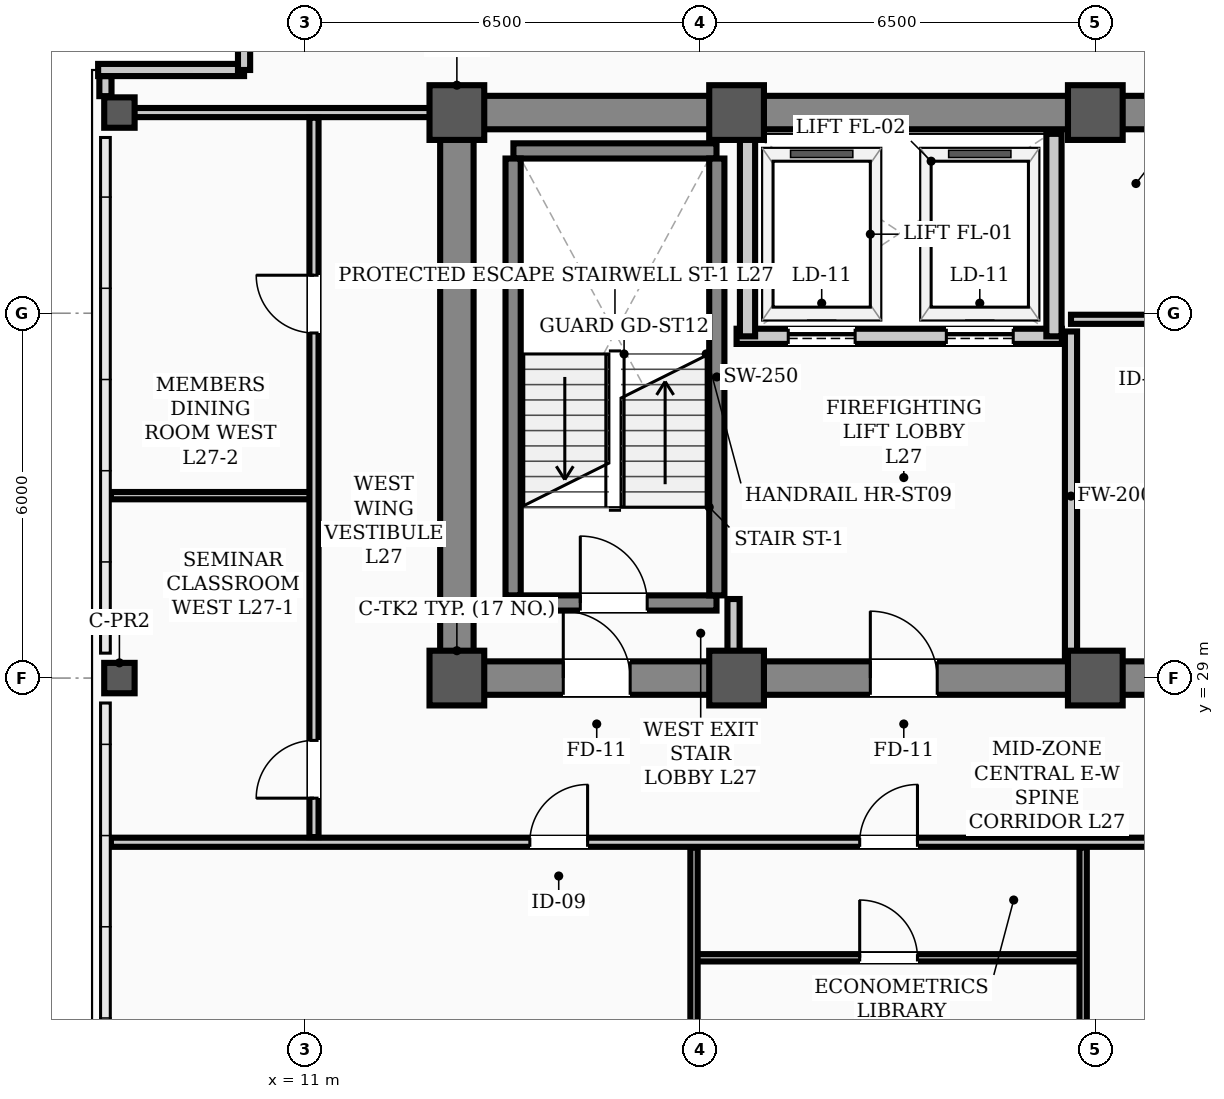
"""IFC4 building model, lengths in metres.
Left out: names, types, materials, properties, quantities, classifications, styles, units other than length and angle.
Written with IfcOpenShell. Run it as: python <this file> out.ifc"""

import sys

from ifc_helpers import new_model, si_unit, direction, frame, frame_2d, origin, origin_2d, place, context, subcontext, project, spatial, rectangle, hollow_rectangle, extrude, element, fill, save


model = new_model("IFC4")
c1 = context("Model", 3, precision=1e-05, world=origin(), true_north=direction((0.0, 1.0)))
c2 = subcontext(c1, "Body", "Model", "MODEL_VIEW")
j1 = project(units=[si_unit("LENGTHUNIT", "METRE"), si_unit("PLANEANGLEUNIT", "RADIAN")], contexts=[c1])
p1 = place(None, origin())
s1 = spatial("IfcSite", under=j1, at=p1, CompositionType="ELEMENT")
p2 = place(p1, origin())
s2 = spatial("IfcBuilding", under=s1, at=p2, CompositionType="ELEMENT")
p3 = place(p2, frame((0.0, 0.0, 111.0)))
s3 = spatial("IfcBuildingStorey", under=s2, at=p3, CompositionType="ELEMENT", Elevation=111.0)
for number, where, z_axis, x_axis in (
    (1, (13.5, 29.0, 0.0), (0.0, 0.0, 1.0), (1.0, 0.0, 0.0)),
    (2, (13.5, 38.3, 0.0), (0.0, 0.0, 1.0), (1.0, 0.0, 0.0)),
    (3, (18.1, 29.0, 0.0), (0.0, 0.0, 1.0), (1.0, 0.0, 0.0)),
    (4, (18.1, 38.3, 0.0), (0.0, 0.0, 1.0), (1.0, 0.0, 0.0)),
    (5, (24.0, 29.0, 0.0), (0.0, 0.0, 1.0), (1.0, 0.0, 0.0)),
    (6, (24.0, 38.3, 0.0), (0.0, 0.0, 1.0), (1.0, 0.0, 0.0)),
):
    element("IfcColumn", number, at=place(p3, frame(where, z_axis=z_axis, x_axis=x_axis)), inside=s3, PredefinedType="COLUMN", context=c2, shape_type="SweptSolid", body=[
        extrude(hollow_rectangle(XDim=0.9, YDim=0.9, WallThickness=0.035, InnerFilletRadius=0.017, OuterFilletRadius=0.052, at=origin_2d()), origin(), (0.0, 0.0, 1.0), 3.9),
    ])
for number, where, z_axis, x_axis in (
    (7, (7.95, 29.0, 0.0), (0.0, 0.0, 1.0), (1.0, 0.0, 0.0)),
    (8, (7.95, 38.3, 0.0), (0.0, 0.0, 1.0), (1.0, 0.0, 0.0)),
):
    element("IfcColumn", number, at=place(p3, frame(where, z_axis=z_axis, x_axis=x_axis)), inside=s3, PredefinedType="COLUMN", context=c2, shape_type="SweptSolid", body=[
        extrude(hollow_rectangle(XDim=0.5, YDim=0.5, WallThickness=0.024, InnerFilletRadius=0.012, OuterFilletRadius=0.036, at=origin_2d()), origin(), (0.0, 0.0, 1.0), 3.9),
    ])
p4 = place(p3, frame((7.72, 38.57, 0.0), z_axis=(0.0, 0.0, 1.0), x_axis=(0.0, 1.0, 0.0)))
e9 = element("IfcWall", 9, at=p4, inside=s3, PredefinedType="PARAPET", context=c2, shape_type="SweptSolid", body=[
    extrude(rectangle(XDim=0.33, YDim=0.2, at=frame_2d((0.165, 0.0))), origin(), (0.0, 0.0, 1.0), 1.2),
])
for number, where, z_axis, x_axis in (
    (10, (7.6, 39.0, 0.0), (0.0, 0.0, 1.0), (1.0, 0.0, 0.0)),
    (11, (10.0, 39.0, 0.0), (0.0, 0.0, 1.0), (0.0, 1.0, 0.0)),
):
    element("IfcWall", number, at=place(p3, frame(where, z_axis=z_axis, x_axis=x_axis)), inside=s3, PredefinedType="PARAPET", context=c2, shape_type="SweptSolid", body=[
        extrude(rectangle(XDim=2.4, YDim=0.2, at=frame_2d((1.2, 0.0))), origin(), (0.0, 0.0, 1.0), 1.2),
    ])
p5 = place(p3, frame((13.5, 29.0, 0.0), z_axis=(0.0, 0.0, 1.0), x_axis=(1.0, 0.0, 0.0)))
e12 = element("IfcWall", 12, at=p5, inside=s3, PredefinedType="SHEAR", context=c2, shape_type="SweptSolid", body=[
    extrude(rectangle(XDim=30.5, YDim=0.55, at=frame_2d((15.25, 0.0))), origin(), (0.0, 0.0, 1.0), 3.66),
])
p6 = place(p5, frame((1.75, 0.0, 0.0)))
e13 = element("IfcOpeningElement", 13, at=p6, cuts=e12, PredefinedType="OPENING", context=c2, shape_type="SweptSolid", body=[
    extrude(rectangle(XDim=1.1, YDim=2.08, at=frame_2d((0.55, 1.04))), frame((0.0, 0.285, 0.0), z_axis=(0.0, -1.0, 0.0), x_axis=(1.0, 0.0, 0.0)), (0.0, 0.0, 1.0), 0.57),
])
p7 = place(p5, frame((26.7, 0.0, 0.0)))
e14 = element("IfcOpeningElement", 14, at=p7, cuts=e12, PredefinedType="OPENING", context=c2, shape_type="SweptSolid", body=[
    extrude(rectangle(XDim=1.1, YDim=2.08, at=frame_2d((0.55, 1.04))), frame((0.0, 0.285, 0.0), z_axis=(0.0, -1.0, 0.0), x_axis=(1.0, 0.0, 0.0)), (0.0, 0.0, 1.0), 0.57),
])
p8 = place(p5, frame((6.8, 0.0, 0.0)))
e15 = element("IfcOpeningElement", 15, at=p8, cuts=e12, PredefinedType="OPENING", context=c2, shape_type="SweptSolid", body=[
    extrude(rectangle(XDim=1.1, YDim=2.08, at=frame_2d((0.55, 1.04))), frame((0.0, 0.285, 0.0), z_axis=(0.0, -1.0, 0.0), x_axis=(1.0, 0.0, 0.0)), (0.0, 0.0, 1.0), 0.57),
])
p9 = place(p5, frame((13.2, 0.0, 0.0)))
e16 = element("IfcOpeningElement", 16, at=p9, cuts=e12, PredefinedType="OPENING", context=c2, shape_type="SweptSolid", body=[
    extrude(rectangle(XDim=1.6, YDim=2.08, at=frame_2d((0.8, 1.04))), frame((0.0, 0.285, 0.0), z_axis=(0.0, -1.0, 0.0), x_axis=(1.0, 0.0, 0.0)), (0.0, 0.0, 1.0), 0.57),
])
p10 = place(p5, frame((19.6, 0.0, 0.0)))
e17 = element("IfcOpeningElement", 17, at=p10, cuts=e12, PredefinedType="OPENING", context=c2, shape_type="SweptSolid", body=[
    extrude(rectangle(XDim=0.9, YDim=2.08, at=frame_2d((0.45, 1.04))), frame((0.0, 0.285, 0.0), z_axis=(0.0, -1.0, 0.0), x_axis=(1.0, 0.0, 0.0)), (0.0, 0.0, 1.0), 0.57),
])
p11 = place(p5, frame((21.6, 0.0, 0.0)))
e18 = element("IfcOpeningElement", 18, at=p11, cuts=e12, PredefinedType="OPENING", context=c2, shape_type="SweptSolid", body=[
    extrude(rectangle(XDim=0.9, YDim=2.08, at=frame_2d((0.45, 1.04))), frame((0.0, 0.285, 0.0), z_axis=(0.0, -1.0, 0.0), x_axis=(1.0, 0.0, 0.0)), (0.0, 0.0, 1.0), 0.57),
])
p12 = place(p3, frame((13.5, 38.3, 0.0), z_axis=(0.0, 0.0, 1.0), x_axis=(1.0, 0.0, 0.0)))
e19 = element("IfcWall", 19, at=p12, inside=s3, PredefinedType="SHEAR", context=c2, shape_type="SweptSolid", body=[
    extrude(rectangle(XDim=30.5, YDim=0.55, at=frame_2d((15.25, 0.0))), origin(), (0.0, 0.0, 1.0), 3.66),
])
p13 = place(p3, frame((13.5, 29.35, 0.0), z_axis=(0.0, 0.0, 1.0), x_axis=(0.0, 1.0, 0.0)))
e20 = element("IfcWall", 20, at=p13, inside=s3, PredefinedType="SHEAR", context=c2, shape_type="SweptSolid", body=[
    extrude(rectangle(XDim=8.6, YDim=0.55, at=frame_2d((4.3, 0.0))), origin(), (0.0, 0.0, 1.0), 3.66),
])
p14 = place(p3, frame((14.43, 30.235, 0.0), z_axis=(0.0, 0.0, 1.0), x_axis=(1.0, 0.0, 0.0)))
e21 = element("IfcWall", 21, at=p14, inside=s3, PredefinedType="STANDARD", context=c2, shape_type="SweptSolid", body=[
    extrude(rectangle(XDim=3.34, YDim=0.25, at=frame_2d((1.67, 0.0))), origin(), (0.0, 0.0, 1.0), 3.66),
])
p15 = place(p14, frame((1.1, 0.0, 0.0)))
e22 = element("IfcOpeningElement", 22, at=p15, cuts=e21, PredefinedType="OPENING", context=c2, shape_type="SweptSolid", body=[
    extrude(rectangle(XDim=1.1, YDim=2.08, at=frame_2d((0.55, 1.04))), frame((0.0, 0.135, 0.0), z_axis=(0.0, -1.0, 0.0), x_axis=(1.0, 0.0, 0.0)), (0.0, 0.0, 1.0), 0.27),
])
p16 = place(p3, frame((14.43, 37.669, 0.0), z_axis=(0.0, 0.0, 1.0), x_axis=(1.0, 0.0, 0.0)))
e23 = element("IfcWall", 23, at=p16, inside=s3, PredefinedType="STANDARD", context=c2, shape_type="SweptSolid", body=[
    extrude(rectangle(XDim=3.34, YDim=0.25, at=frame_2d((1.67, 0.0))), origin(), (0.0, 0.0, 1.0), 3.66),
])
for number, where, z_axis, x_axis in (
    (24, (14.425, 30.36, 0.0), (0.0, 0.0, 1.0), (0.0, 1.0, 0.0)),
    (25, (17.775, 30.36, 0.0), (0.0, 0.0, 1.0), (0.0, 1.0, 0.0)),
):
    element("IfcWall", number, at=place(p3, frame(where, z_axis=z_axis, x_axis=x_axis)), inside=s3, PredefinedType="STANDARD", context=c2, shape_type="SweptSolid", body=[
        extrude(rectangle(XDim=7.184, YDim=0.25, at=frame_2d((3.592, 0.0))), origin(), (0.0, 0.0, 1.0), 3.66),
    ])
p17 = place(p3, frame((18.1, 34.62, 0.0), z_axis=(0.0, 0.0, 1.0), x_axis=(1.0, 0.0, 0.0)))
e26 = element("IfcWall", 26, at=p17, inside=s3, PredefinedType="STANDARD", context=c2, shape_type="SweptSolid", body=[
    extrude(rectangle(XDim=5.35, YDim=0.25, at=frame_2d((2.675, 0.0))), origin(), (0.0, 0.0, 1.0), 3.66),
])
p18 = place(p17, frame((0.85, 0.0, 0.0)))
e27 = element("IfcOpeningElement", 27, at=p18, cuts=e26, PredefinedType="OPENING", context=c2, shape_type="SweptSolid", body=[
    extrude(rectangle(XDim=1.1, YDim=2.08, at=frame_2d((0.55, 1.04))), frame((0.0, 0.135, 0.0), z_axis=(0.0, -1.0, 0.0), x_axis=(1.0, 0.0, 0.0)), (0.0, 0.0, 1.0), 0.27),
])
p19 = place(p17, frame((3.45, 0.0, 0.0)))
e28 = element("IfcOpeningElement", 28, at=p19, cuts=e26, PredefinedType="OPENING", context=c2, shape_type="SweptSolid", body=[
    extrude(rectangle(XDim=1.1, YDim=2.08, at=frame_2d((0.55, 1.04))), frame((0.0, 0.135, 0.0), z_axis=(0.0, -1.0, 0.0), x_axis=(1.0, 0.0, 0.0)), (0.0, 0.0, 1.0), 0.27),
])
for number, where, z_axis, x_axis in (
    (29, (18.28, 34.62, 0.0), (0.0, 0.0, 1.0), (0.0, 1.0, 0.0)),
    (30, (23.32, 34.62, 0.0), (0.0, 0.0, 1.0), (0.0, 1.0, 0.0)),
):
    element("IfcWall", number, at=place(p3, frame(where, z_axis=z_axis, x_axis=x_axis)), inside=s3, PredefinedType="STANDARD", context=c2, shape_type="SweptSolid", body=[
        extrude(rectangle(XDim=3.33, YDim=0.25, at=frame_2d((1.665, 0.0))), origin(), (0.0, 0.0, 1.0), 2.24),
    ])
p20 = place(p3, frame((23.6, 34.9, 0.0), z_axis=(0.0, 0.0, 1.0), x_axis=(1.0, 0.0, 0.0)))
e31 = element("IfcWall", 31, at=p20, inside=s3, PredefinedType="PARTITIONING", context=c2, shape_type="SweptSolid", body=[
    extrude(rectangle(XDim=4.58, YDim=0.15, at=frame_2d((2.29, 0.0))), origin(), (0.0, 0.0, 1.0), 3.66),
])
p21 = place(p20, frame((1.875, 0.0, 0.0)))
e32 = element("IfcOpeningElement", 32, at=p21, cuts=e31, PredefinedType="OPENING", context=c2, shape_type="SweptSolid", body=[
    extrude(rectangle(XDim=0.95, YDim=2.08, at=frame_2d((0.475, 1.04))), frame((0.0, 0.085, 0.0), z_axis=(0.0, -1.0, 0.0), x_axis=(1.0, 0.0, 0.0)), (0.0, 0.0, 1.0), 0.17),
])
p22 = place(p3, frame((7.81, 26.3, 0.0), z_axis=(0.0, 0.0, 1.0), x_axis=(1.0, 0.0, 0.0)))
e33 = element("IfcWall", 33, at=p22, inside=s3, PredefinedType="PARTITIONING", context=c2, shape_type="SweptSolid", body=[
    extrude(rectangle(XDim=49.38, YDim=0.15, at=frame_2d((24.69, 0.0))), origin(), (0.0, 0.0, 1.0), 2.24),
])
p23 = place(p22, frame((6.89, 0.0, 0.0)))
e34 = element("IfcOpeningElement", 34, at=p23, cuts=e33, PredefinedType="OPENING", context=c2, shape_type="SweptSolid", body=[
    extrude(rectangle(XDim=0.95, YDim=2.08, at=frame_2d((0.475, 1.04))), frame((0.0, 0.085, 0.0), z_axis=(0.0, -1.0, 0.0), x_axis=(1.0, 0.0, 0.0)), (0.0, 0.0, 1.0), 0.17),
])
p24 = place(p22, frame((12.315, 0.0, 0.0)))
e35 = element("IfcOpeningElement", 35, at=p24, cuts=e33, PredefinedType="OPENING", context=c2, shape_type="SweptSolid", body=[
    extrude(rectangle(XDim=0.95, YDim=2.08, at=frame_2d((0.475, 1.04))), frame((0.0, 0.085, 0.0), z_axis=(0.0, -1.0, 0.0), x_axis=(1.0, 0.0, 0.0)), (0.0, 0.0, 1.0), 0.17),
])
p25 = place(p22, frame((18.815, 0.0, 0.0)))
e36 = element("IfcOpeningElement", 36, at=p25, cuts=e33, PredefinedType="OPENING", context=c2, shape_type="SweptSolid", body=[
    extrude(rectangle(XDim=0.95, YDim=2.08, at=frame_2d((0.475, 1.04))), frame((0.0, 0.085, 0.0), z_axis=(0.0, -1.0, 0.0), x_axis=(1.0, 0.0, 0.0)), (0.0, 0.0, 1.0), 0.17),
])
p26 = place(p22, frame((25.415, 0.0, 0.0)))
e37 = element("IfcOpeningElement", 37, at=p26, cuts=e33, PredefinedType="OPENING", context=c2, shape_type="SweptSolid", body=[
    extrude(rectangle(XDim=0.95, YDim=2.08, at=frame_2d((0.475, 1.04))), frame((0.0, 0.085, 0.0), z_axis=(0.0, -1.0, 0.0), x_axis=(1.0, 0.0, 0.0)), (0.0, 0.0, 1.0), 0.17),
])
p27 = place(p22, frame((31.915, 0.0, 0.0)))
e38 = element("IfcOpeningElement", 38, at=p27, cuts=e33, PredefinedType="OPENING", context=c2, shape_type="SweptSolid", body=[
    extrude(rectangle(XDim=0.95, YDim=2.08, at=frame_2d((0.475, 1.04))), frame((0.0, 0.085, 0.0), z_axis=(0.0, -1.0, 0.0), x_axis=(1.0, 0.0, 0.0)), (0.0, 0.0, 1.0), 0.17),
])
p28 = place(p22, frame((36.59, 0.0, 0.0)))
e39 = element("IfcOpeningElement", 39, at=p28, cuts=e33, PredefinedType="OPENING", context=c2, shape_type="SweptSolid", body=[
    extrude(rectangle(XDim=0.95, YDim=2.08, at=frame_2d((0.475, 1.04))), frame((0.0, 0.085, 0.0), z_axis=(0.0, -1.0, 0.0), x_axis=(1.0, 0.0, 0.0)), (0.0, 0.0, 1.0), 0.17),
])
p29 = place(p3, frame((7.81, 38.3, 0.0), z_axis=(0.0, 0.0, 1.0), x_axis=(1.0, 0.0, 0.0)))
e40 = element("IfcWall", 40, at=p29, inside=s3, PredefinedType="PARTITIONING", context=c2, shape_type="SweptSolid", body=[
    extrude(rectangle(XDim=5.69, YDim=0.15, at=frame_2d((2.845, 0.0))), origin(), (0.0, 0.0, 1.0), 2.24),
])
p30 = place(p3, frame((17.4, 24.4, 0.0), z_axis=(0.0, 0.0, 1.0), x_axis=(1.0, 0.0, 0.0)))
e41 = element("IfcWall", 41, at=p30, inside=s3, PredefinedType="PARTITIONING", context=c2, shape_type="SweptSolid", body=[
    extrude(rectangle(XDim=6.4, YDim=0.12, at=frame_2d((3.2, 0.0))), origin(), (0.0, 0.0, 1.0), 2.24),
])
p31 = place(p30, frame((2.725, 0.0, 0.0)))
e42 = element("IfcOpeningElement", 42, at=p31, cuts=e41, PredefinedType="OPENING", context=c2, shape_type="SweptSolid", body=[
    extrude(rectangle(XDim=0.95, YDim=2.08, at=frame_2d((0.475, 1.04))), frame((0.0, 0.07, 0.0), z_axis=(0.0, -1.0, 0.0), x_axis=(1.0, 0.0, 0.0)), (0.0, 0.0, 1.0), 0.14),
])
p32 = place(p3, frame((7.81, 32.0, 0.0), z_axis=(0.0, 0.0, 1.0), x_axis=(1.0, 0.0, 0.0)))
e43 = element("IfcWall", 43, at=p32, inside=s3, PredefinedType="PARTITIONING", context=c2, shape_type="SweptSolid", body=[
    extrude(rectangle(XDim=3.34, YDim=0.12, at=frame_2d((1.67, 0.0))), origin(), (0.0, 0.0, 1.0), 3.66),
])
p33 = place(p3, frame((18.05, 29.285, 0.0), z_axis=(0.0, 0.0, 1.0), x_axis=(0.0, 1.0, 0.0)))
e44 = element("IfcWall", 44, at=p33, inside=s3, PredefinedType="STANDARD", context=c2, shape_type="SweptSolid", body=[
    extrude(rectangle(XDim=1.015, YDim=0.2, at=frame_2d((0.508, 0.0))), origin(), (0.0, 0.0, 1.0), 2.24),
])
p34 = place(p3, frame((23.6, 29.285, 0.0), z_axis=(0.0, 0.0, 1.0), x_axis=(0.0, 1.0, 0.0)))
e45 = element("IfcWall", 45, at=p34, inside=s3, PredefinedType="STANDARD", context=c2, shape_type="SweptSolid", body=[
    extrude(rectangle(XDim=5.415, YDim=0.2, at=frame_2d((2.708, 0.0))), origin(), (0.0, 0.0, 1.0), 2.24),
])
p35 = place(p3, frame((11.15, 26.385, 0.0), z_axis=(0.0, 0.0, 1.0), x_axis=(0.0, 1.0, 0.0)))
e46 = element("IfcWall", 46, at=p35, inside=s3, PredefinedType="PARTITIONING", context=c2, shape_type="SweptSolid", body=[
    extrude(rectangle(XDim=11.83, YDim=0.15, at=frame_2d((5.915, 0.0))), origin(), (0.0, 0.0, 1.0), 2.24),
])
p36 = place(p35, frame((0.64, 0.0, 0.0)))
e47 = element("IfcOpeningElement", 47, at=p36, cuts=e46, PredefinedType="OPENING", context=c2, shape_type="SweptSolid", body=[
    extrude(rectangle(XDim=0.95, YDim=2.08, at=frame_2d((0.475, 1.04))), frame((0.0, 0.085, 0.0), z_axis=(0.0, -1.0, 0.0), x_axis=(1.0, 0.0, 0.0)), (0.0, 0.0, 1.0), 0.17),
])
p37 = place(p35, frame((8.29, 0.0, 0.0)))
e48 = element("IfcOpeningElement", 48, at=p37, cuts=e46, PredefinedType="OPENING", context=c2, shape_type="SweptSolid", body=[
    extrude(rectangle(XDim=0.95, YDim=2.08, at=frame_2d((0.475, 1.04))), frame((0.0, 0.085, 0.0), z_axis=(0.0, -1.0, 0.0), x_axis=(1.0, 0.0, 0.0)), (0.0, 0.0, 1.0), 0.17),
])
p38 = place(p3, frame((17.4, 9.81, 0.0), z_axis=(0.0, 0.0, 1.0), x_axis=(0.0, 1.0, 0.0)))
e49 = element("IfcWall", 49, at=p38, inside=s3, PredefinedType="PARTITIONING", context=c2, shape_type="SweptSolid", body=[
    extrude(rectangle(XDim=16.405, YDim=0.12, at=frame_2d((8.203, 0.0))), origin(), (0.0, 0.0, 1.0), 2.24),
])
p39 = place(p3, frame((23.8, 11.57, 0.0), z_axis=(0.0, 0.0, 1.0), x_axis=(0.0, 1.0, 0.0)))
e50 = element("IfcWall", 50, at=p39, inside=s3, PredefinedType="PARTITIONING", context=c2, shape_type="SweptSolid", body=[
    extrude(rectangle(XDim=14.645, YDim=0.12, at=frame_2d((7.323, 0.0))), origin(), (0.0, 0.0, 1.0), 2.24),
])
p40 = place(p15, origin())
e51 = element("IfcDoor", 51, at=p40, inside=s3, OperationType="SINGLE_SWING_LEFT", PredefinedType="DOOR", context=c2, shape_type="SweptSolid", body=[
    extrude(rectangle(XDim=1.1, YDim=2.08, at=frame_2d((0.55, 1.04))), frame((0.0, 0.025, 0.0), z_axis=(0.0, -1.0, 0.0), x_axis=(1.0, 0.0, 0.0)), (0.0, 0.0, 1.0), 0.05),
])
fill(e22, e51)
p41 = place(p6, origin())
e52 = element("IfcDoor", 52, at=p41, inside=s3, OperationType="SINGLE_SWING_LEFT", PredefinedType="DOOR", context=c2, shape_type="SweptSolid", body=[
    extrude(rectangle(XDim=1.1, YDim=2.08, at=frame_2d((0.55, 1.04))), frame((0.0, 0.025, 0.0), z_axis=(0.0, -1.0, 0.0), x_axis=(1.0, 0.0, 0.0)), (0.0, 0.0, 1.0), 0.05),
])
fill(e13, e52)
p42 = place(p8, origin())
e53 = element("IfcDoor", 53, at=p42, inside=s3, OperationType="SINGLE_SWING_LEFT", PredefinedType="DOOR", context=c2, shape_type="SweptSolid", body=[
    extrude(rectangle(XDim=1.1, YDim=2.08, at=frame_2d((0.55, 1.04))), frame((0.0, 0.025, 0.0), z_axis=(0.0, -1.0, 0.0), x_axis=(1.0, 0.0, 0.0)), (0.0, 0.0, 1.0), 0.05),
])
fill(e15, e53)
p43 = place(p23, origin())
e54 = element("IfcDoor", 54, at=p43, inside=s3, OperationType="SINGLE_SWING_RIGHT", PredefinedType="DOOR", context=c2, shape_type="SweptSolid", body=[
    extrude(rectangle(XDim=0.95, YDim=2.08, at=frame_2d((0.475, 1.04))), frame((0.0, 0.025, 0.0), z_axis=(0.0, -1.0, 0.0), x_axis=(1.0, 0.0, 0.0)), (0.0, 0.0, 1.0), 0.05),
])
fill(e34, e54)
p44 = place(p31, origin())
e55 = element("IfcDoor", 55, at=p44, inside=s3, OperationType="SINGLE_SWING_LEFT", PredefinedType="DOOR", context=c2, shape_type="SweptSolid", body=[
    extrude(rectangle(XDim=0.95, YDim=2.08, at=frame_2d((0.475, 1.04))), frame((0.0, 0.025, 0.0), z_axis=(0.0, -1.0, 0.0), x_axis=(1.0, 0.0, 0.0)), (0.0, 0.0, 1.0), 0.05),
])
fill(e42, e55)
p45 = place(p24, origin())
e56 = element("IfcDoor", 56, at=p45, inside=s3, OperationType="SINGLE_SWING_RIGHT", PredefinedType="DOOR", context=c2, shape_type="SweptSolid", body=[
    extrude(rectangle(XDim=0.95, YDim=2.08, at=frame_2d((0.475, 1.04))), frame((0.0, 0.025, 0.0), z_axis=(0.0, -1.0, 0.0), x_axis=(1.0, 0.0, 0.0)), (0.0, 0.0, 1.0), 0.05),
])
fill(e35, e56)
p46 = place(p36, origin())
e57 = element("IfcDoor", 57, at=p46, inside=s3, OperationType="SINGLE_SWING_LEFT", PredefinedType="DOOR", context=c2, shape_type="SweptSolid", body=[
    extrude(rectangle(XDim=0.95, YDim=2.08, at=frame_2d((0.475, 1.04))), frame((0.0, 0.025, 0.0), z_axis=(0.0, -1.0, 0.0), x_axis=(1.0, 0.0, 0.0)), (0.0, 0.0, 1.0), 0.05),
])
fill(e47, e57)
p47 = place(p37, origin())
e58 = element("IfcDoor", 58, at=p47, inside=s3, OperationType="SINGLE_SWING_RIGHT", PredefinedType="DOOR", context=c2, shape_type="SweptSolid", body=[
    extrude(rectangle(XDim=0.95, YDim=2.08, at=frame_2d((0.475, 1.04))), frame((0.0, 0.025, 0.0), z_axis=(0.0, -1.0, 0.0), x_axis=(1.0, 0.0, 0.0)), (0.0, 0.0, 1.0), 0.05),
])
fill(e48, e58)
p48 = place(p18, origin())
e59 = element("IfcDoor", 59, at=p48, inside=s3, OperationType="SLIDING_TO_LEFT", PredefinedType="DOOR", context=c2, shape_type="SweptSolid", body=[
    extrude(rectangle(XDim=1.1, YDim=2.08, at=frame_2d((0.55, 1.04))), frame((0.0, 0.025, 0.0), z_axis=(0.0, -1.0, 0.0), x_axis=(1.0, 0.0, 0.0)), (0.0, 0.0, 1.0), 0.05),
])
fill(e27, e59)
p49 = place(p19, origin())
e60 = element("IfcDoor", 60, at=p49, inside=s3, OperationType="SLIDING_TO_LEFT", PredefinedType="DOOR", context=c2, shape_type="SweptSolid", body=[
    extrude(rectangle(XDim=1.1, YDim=2.08, at=frame_2d((0.55, 1.04))), frame((0.0, 0.025, 0.0), z_axis=(0.0, -1.0, 0.0), x_axis=(1.0, 0.0, 0.0)), (0.0, 0.0, 1.0), 0.05),
])
fill(e28, e60)
save(model, sys.argv[1])
